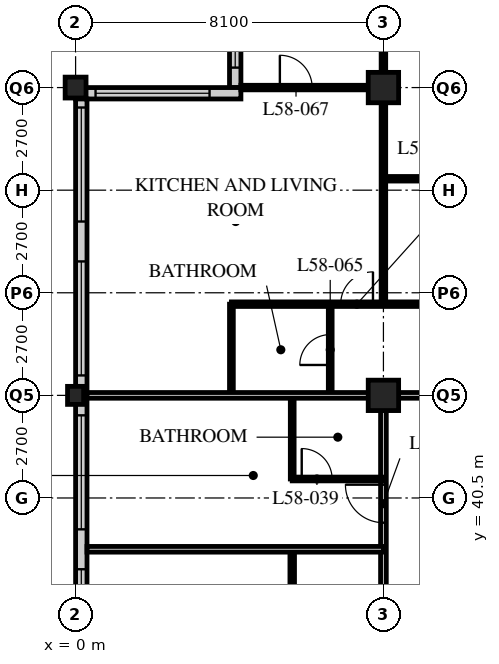
"""IFC4 building model, lengths in metres.
Left out: names, types, materials, properties, quantities, classifications, styles, units other than length and angle.
Written with IfcOpenShell. Run it as: python <this file> out.ifc"""

import sys

from ifc_helpers import new_model, si_unit, direction, frame, frame_2d, origin, origin_2d, place, context, subcontext, project, spatial, rectangle, hollow_rectangle, i_section, extrude, element, fill, save


model = new_model("IFC4")
c1 = context("Model", 3, precision=1e-05, world=origin(), true_north=direction((0.0, 1.0)))
c2 = subcontext(c1, "Body", "Model", "MODEL_VIEW")
j1 = project(units=[si_unit("LENGTHUNIT", "METRE"), si_unit("PLANEANGLEUNIT", "RADIAN")], contexts=[c1])
p1 = place(None, origin())
s1 = spatial("IfcSite", under=j1, at=p1, CompositionType="ELEMENT")
p2 = place(p1, origin())
s2 = spatial("IfcBuilding", under=s1, at=p2, CompositionType="ELEMENT")
p3 = place(p2, frame((0.0, 0.0, 224.4)))
s3 = spatial("IfcBuildingStorey", under=s2, at=p3, CompositionType="ELEMENT", Elevation=224.4)
p4 = place(p3, frame((0.0, 43.2, 0.0), z_axis=(0.0, 0.0, 1.0), x_axis=(1.0, 0.0, 0.0)))
e1 = element("IfcColumn", 1, at=p4, inside=s3, PredefinedType="COLUMN", context=c2, shape_type="SweptSolid", body=[
    extrude(i_section(OverallWidth=0.424, OverallDepth=0.475, WebThickness=0.048, FlangeThickness=0.077, FilletRadius=0.015, at=origin_2d()), origin(), (0.0, 0.0, 1.0), 3.6),
])
p5 = place(p3, frame((0.0, 51.3, 0.0), z_axis=(0.0, 0.0, 1.0), x_axis=(1.0, 0.0, 0.0)))
e2 = element("IfcColumn", 2, at=p5, inside=s3, PredefinedType="COLUMN", context=c2, shape_type="SweptSolid", body=[
    extrude(hollow_rectangle(XDim=0.55, YDim=0.55, WallThickness=0.045, at=origin_2d()), origin(), (0.0, 0.0, 1.0), 3.6),
])
for number, where, z_axis, x_axis in (
    (3, (8.1, 43.2, 0.0), (0.0, 0.0, 1.0), (1.0, 0.0, 0.0)),
    (4, (8.1, 51.3, 0.0), (0.0, 0.0, 1.0), (1.0, 0.0, 0.0)),
):
    element("IfcColumn", number, at=place(p3, frame(where, z_axis=z_axis, x_axis=x_axis)), inside=s3, PredefinedType="COLUMN", context=c2, shape_type="SweptSolid", body=[
        extrude(hollow_rectangle(XDim=0.8, YDim=0.8, WallThickness=0.08, at=origin_2d()), origin(), (0.0, 0.0, 1.0), 3.6),
    ])
p6 = place(p3, frame((4.2, 55.05, 0.0), z_axis=(0.0, 0.0, 1.0), x_axis=(0.0, -1.0, 0.0)))
e5 = element("IfcWall", 5, at=p6, inside=s3, PredefinedType="SOLIDWALL", context=c2, shape_type="SweptSolid", body=[
    extrude(rectangle(XDim=3.75, YDim=0.3, at=frame_2d((1.875, 0.0))), origin(), (0.0, 0.0, 1.0), 3.39),
])
p7 = place(p6, frame((0.225, 0.0, 0.6)))
e6 = element("IfcOpeningElement", 6, at=p7, cuts=e5, PredefinedType="OPENING", context=c2, shape_type="SweptSolid", body=[
    extrude(rectangle(XDim=3.0, YDim=2.0, at=frame_2d((1.5, 1.0))), frame((0.0, 0.16, 0.0), z_axis=(0.0, -1.0, 0.0), x_axis=(1.0, 0.0, 0.0)), (0.0, 0.0, 1.0), 0.32),
])
p8 = place(p3, frame((4.35, 51.15, 0.0), z_axis=(0.0, 0.0, 1.0), x_axis=(-1.0, 0.0, 0.0)))
e7 = element("IfcWall", 7, at=p8, inside=s3, PredefinedType="SOLIDWALL", context=c2, shape_type="SweptSolid", body=[
    extrude(rectangle(XDim=4.35, YDim=0.3, at=frame_2d((2.175, 0.0))), origin(), (0.0, 0.0, 1.0), 3.39),
])
p9 = place(p8, frame((0.825, 0.0, 0.6)))
e8 = element("IfcOpeningElement", 8, at=p9, cuts=e7, PredefinedType="OPENING", context=c2, shape_type="SweptSolid", body=[
    extrude(rectangle(XDim=3.0, YDim=2.0, at=frame_2d((1.5, 1.0))), frame((0.0, 0.16, 0.0), z_axis=(0.0, -1.0, 0.0), x_axis=(1.0, 0.0, 0.0)), (0.0, 0.0, 1.0), 0.32),
])
p10 = place(p3, frame((0.15, 51.0, 0.0), z_axis=(0.0, 0.0, 1.0), x_axis=(0.0, -1.0, 0.0)))
e9 = element("IfcWall", 9, at=p10, inside=s3, PredefinedType="SOLIDWALL", context=c2, shape_type="SweptSolid", body=[
    extrude(rectangle(XDim=32.1, YDim=0.3, at=frame_2d((16.05, 0.0))), origin(), (0.0, 0.0, 1.0), 3.39),
])
p11 = place(p10, frame((0.225, 0.0, 0.6)))
e10 = element("IfcOpeningElement", 10, at=p11, cuts=e9, PredefinedType="OPENING", context=c2, shape_type="SweptSolid", body=[
    extrude(rectangle(XDim=3.0, YDim=2.0, at=frame_2d((1.5, 1.0))), frame((0.0, 0.16, 0.0), z_axis=(0.0, -1.0, 0.0), x_axis=(1.0, 0.0, 0.0)), (0.0, 0.0, 1.0), 0.32),
])
p12 = place(p10, frame((4.275, 0.0, 0.6)))
e11 = element("IfcOpeningElement", 11, at=p12, cuts=e9, PredefinedType="OPENING", context=c2, shape_type="SweptSolid", body=[
    extrude(rectangle(XDim=3.0, YDim=2.0, at=frame_2d((1.5, 1.0))), frame((0.0, 0.16, 0.0), z_axis=(0.0, -1.0, 0.0), x_axis=(1.0, 0.0, 0.0)), (0.0, 0.0, 1.0), 0.32),
])
p13 = place(p10, frame((8.325, 0.0, 0.6)))
e12 = element("IfcOpeningElement", 12, at=p13, cuts=e9, PredefinedType="OPENING", context=c2, shape_type="SweptSolid", body=[
    extrude(rectangle(XDim=3.0, YDim=2.0, at=frame_2d((1.5, 1.0))), frame((0.0, 0.16, 0.0), z_axis=(0.0, -1.0, 0.0), x_axis=(1.0, 0.0, 0.0)), (0.0, 0.0, 1.0), 0.32),
])
p14 = place(p10, frame((12.375, 0.0, 0.6)))
e13 = element("IfcOpeningElement", 13, at=p14, cuts=e9, PredefinedType="OPENING", context=c2, shape_type="SweptSolid", body=[
    extrude(rectangle(XDim=3.0, YDim=2.0, at=frame_2d((1.5, 1.0))), frame((0.0, 0.16, 0.0), z_axis=(0.0, -1.0, 0.0), x_axis=(1.0, 0.0, 0.0)), (0.0, 0.0, 1.0), 0.32),
])
p15 = place(p10, frame((16.425, 0.0, 0.6)))
e14 = element("IfcOpeningElement", 14, at=p15, cuts=e9, PredefinedType="OPENING", context=c2, shape_type="SweptSolid", body=[
    extrude(rectangle(XDim=3.0, YDim=2.0, at=frame_2d((1.5, 1.0))), frame((0.0, 0.16, 0.0), z_axis=(0.0, -1.0, 0.0), x_axis=(1.0, 0.0, 0.0)), (0.0, 0.0, 1.0), 0.32),
])
p16 = place(p10, frame((20.475, 0.0, 0.6)))
e15 = element("IfcOpeningElement", 15, at=p16, cuts=e9, PredefinedType="OPENING", context=c2, shape_type="SweptSolid", body=[
    extrude(rectangle(XDim=3.0, YDim=2.0, at=frame_2d((1.5, 1.0))), frame((0.0, 0.16, 0.0), z_axis=(0.0, -1.0, 0.0), x_axis=(1.0, 0.0, 0.0)), (0.0, 0.0, 1.0), 0.32),
])
p17 = place(p10, frame((24.525, 0.0, 0.6)))
e16 = element("IfcOpeningElement", 16, at=p17, cuts=e9, PredefinedType="OPENING", context=c2, shape_type="SweptSolid", body=[
    extrude(rectangle(XDim=3.0, YDim=2.0, at=frame_2d((1.5, 1.0))), frame((0.0, 0.16, 0.0), z_axis=(0.0, -1.0, 0.0), x_axis=(1.0, 0.0, 0.0)), (0.0, 0.0, 1.0), 0.32),
])
p18 = place(p10, frame((28.575, 0.0, 0.6)))
e17 = element("IfcOpeningElement", 17, at=p18, cuts=e9, PredefinedType="OPENING", context=c2, shape_type="SweptSolid", body=[
    extrude(rectangle(XDim=3.0, YDim=2.0, at=frame_2d((1.5, 1.0))), frame((0.0, 0.16, 0.0), z_axis=(0.0, -1.0, 0.0), x_axis=(1.0, 0.0, 0.0)), (0.0, 0.0, 1.0), 0.32),
])
p19 = place(p3, frame((8.1, 43.2, 0.0), z_axis=(0.0, 0.0, 1.0), x_axis=(1.0, 0.0, 0.0)))
e18 = element("IfcWall", 18, at=p19, inside=s3, PredefinedType="PARTITIONING", context=c2, shape_type="SweptSolid", body=[
    extrude(rectangle(XDim=36.45, YDim=0.15, at=frame_2d((18.225, 0.0))), origin(), (0.0, 0.0, 1.0), 2.628),
])
p20 = place(p19, frame((4.45, 0.0, 0.0)))
e19 = element("IfcOpeningElement", 19, at=p20, cuts=e18, PredefinedType="OPENING", context=c2, shape_type="SweptSolid", body=[
    extrude(rectangle(XDim=1.0, YDim=2.1, at=frame_2d((0.5, 1.05))), frame((0.0, 0.085, 0.0), z_axis=(0.0, -1.0, 0.0), x_axis=(1.0, 0.0, 0.0)), (0.0, 0.0, 1.0), 0.17),
])
p21 = place(p19, frame((17.1, 0.0, 0.0)))
e20 = element("IfcOpeningElement", 20, at=p21, cuts=e18, PredefinedType="OPENING", context=c2, shape_type="SweptSolid", body=[
    extrude(rectangle(XDim=1.0, YDim=2.1, at=frame_2d((0.5, 1.05))), frame((0.0, 0.085, 0.0), z_axis=(0.0, -1.0, 0.0), x_axis=(1.0, 0.0, 0.0)), (0.0, 0.0, 1.0), 0.17),
])
p22 = place(p19, frame((29.05, 0.0, 0.0)))
e21 = element("IfcOpeningElement", 21, at=p22, cuts=e18, PredefinedType="OPENING", context=c2, shape_type="SweptSolid", body=[
    extrude(rectangle(XDim=1.0, YDim=2.1, at=frame_2d((0.5, 1.05))), frame((0.0, 0.085, 0.0), z_axis=(0.0, -1.0, 0.0), x_axis=(1.0, 0.0, 0.0)), (0.0, 0.0, 1.0), 0.17),
])
p23 = place(p19, frame((33.925, 0.0, 0.0)))
e22 = element("IfcOpeningElement", 22, at=p23, cuts=e18, PredefinedType="OPENING", context=c2, shape_type="SweptSolid", body=[
    extrude(rectangle(XDim=1.0, YDim=2.1, at=frame_2d((0.5, 1.05))), frame((0.0, 0.085, 0.0), z_axis=(0.0, -1.0, 0.0), x_axis=(1.0, 0.0, 0.0)), (0.0, 0.0, 1.0), 0.17),
])
p24 = place(p19, frame((1.525, 0.0, 0.0)))
e23 = element("IfcOpeningElement", 23, at=p24, cuts=e18, PredefinedType="OPENING", context=c2, shape_type="SweptSolid", body=[
    extrude(rectangle(XDim=1.0, YDim=2.1, at=frame_2d((0.5, 1.05))), frame((0.0, 0.085, 0.0), z_axis=(0.0, -1.0, 0.0), x_axis=(1.0, 0.0, 0.0)), (0.0, 0.0, 1.0), 0.17),
])
p25 = place(p3, frame((8.1, 18.9, 0.0), z_axis=(0.0, 0.0, 1.0), x_axis=(0.0, 1.0, 0.0)))
e24 = element("IfcWall", 24, at=p25, inside=s3, PredefinedType="PARTITIONING", context=c2, shape_type="SweptSolid", body=[
    extrude(rectangle(XDim=24.3, YDim=0.15, at=frame_2d((12.15, 0.0))), origin(), (0.0, 0.0, 1.0), 2.628),
])
p26 = place(p25, frame((0.9, 0.0, 0.0)))
e25 = element("IfcOpeningElement", 25, at=p26, cuts=e24, PredefinedType="OPENING", context=c2, shape_type="SweptSolid", body=[
    extrude(rectangle(XDim=1.0, YDim=2.1, at=frame_2d((0.5, 1.05))), frame((0.0, 0.085, 0.0), z_axis=(0.0, -1.0, 0.0), x_axis=(1.0, 0.0, 0.0)), (0.0, 0.0, 1.0), 0.17),
])
p27 = place(p25, frame((20.95, 0.0, 0.0)))
e26 = element("IfcOpeningElement", 26, at=p27, cuts=e24, PredefinedType="OPENING", context=c2, shape_type="SweptSolid", body=[
    extrude(rectangle(XDim=1.0, YDim=2.1, at=frame_2d((0.5, 1.05))), frame((0.0, 0.085, 0.0), z_axis=(0.0, -1.0, 0.0), x_axis=(1.0, 0.0, 0.0)), (0.0, 0.0, 1.0), 0.17),
])
p28 = place(p3, frame((5.7, 18.9, 0.0), z_axis=(0.0, 0.0, 1.0), x_axis=(0.0, 1.0, 0.0)))
e27 = element("IfcWall", 27, at=p28, inside=s3, PredefinedType="PARTITIONING", context=c2, shape_type="SweptSolid", body=[
    extrude(rectangle(XDim=20.25, YDim=0.12, at=frame_2d((10.125, 0.0))), origin(), (0.0, 0.0, 1.0), 3.39),
])
p29 = place(p28, frame((0.975, 0.0, 0.0)))
e28 = element("IfcOpeningElement", 28, at=p29, cuts=e27, PredefinedType="OPENING", context=c2, shape_type="SweptSolid", body=[
    extrude(rectangle(XDim=0.85, YDim=2.1, at=frame_2d((0.425, 1.05))), frame((0.0, 0.07, 0.0), z_axis=(0.0, -1.0, 0.0), x_axis=(1.0, 0.0, 0.0)), (0.0, 0.0, 1.0), 0.14),
])
p30 = place(p28, frame((8.425, 0.0, 0.0)))
e29 = element("IfcOpeningElement", 29, at=p30, cuts=e27, PredefinedType="OPENING", context=c2, shape_type="SweptSolid", body=[
    extrude(rectangle(XDim=0.85, YDim=2.1, at=frame_2d((0.425, 1.05))), frame((0.0, 0.07, 0.0), z_axis=(0.0, -1.0, 0.0), x_axis=(1.0, 0.0, 0.0)), (0.0, 0.0, 1.0), 0.14),
])
p31 = place(p28, frame((12.475, 0.0, 0.0)))
e30 = element("IfcOpeningElement", 30, at=p31, cuts=e27, PredefinedType="OPENING", context=c2, shape_type="SweptSolid", body=[
    extrude(rectangle(XDim=0.85, YDim=2.1, at=frame_2d((0.425, 1.05))), frame((0.0, 0.07, 0.0), z_axis=(0.0, -1.0, 0.0), x_axis=(1.0, 0.0, 0.0)), (0.0, 0.0, 1.0), 0.14),
])
p32 = place(p28, frame((16.525, 0.0, 0.0)))
e31 = element("IfcOpeningElement", 31, at=p32, cuts=e27, PredefinedType="OPENING", context=c2, shape_type="SweptSolid", body=[
    extrude(rectangle(XDim=0.85, YDim=2.1, at=frame_2d((0.425, 1.05))), frame((0.0, 0.07, 0.0), z_axis=(0.0, -1.0, 0.0), x_axis=(1.0, 0.0, 0.0)), (0.0, 0.0, 1.0), 0.14),
])
p33 = place(p3, frame((8.1, 39.15, 0.0), z_axis=(0.0, 0.0, 1.0), x_axis=(-1.0, 0.0, 0.0)))
e32 = element("IfcWall", 32, at=p33, inside=s3, PredefinedType="PARTITIONING", context=c2, shape_type="SweptSolid", body=[
    extrude(rectangle(XDim=7.8, YDim=0.15, at=frame_2d((3.9, 0.0))), origin(), (0.0, 0.0, 1.0), 3.39),
])
p34 = place(p3, frame((5.7, 41.0, 0.0), z_axis=(0.0, 0.0, 1.0), x_axis=(0.0, 1.0, 0.0)))
e33 = element("IfcWall", 33, at=p34, inside=s3, PredefinedType="PARTITIONING", context=c2, shape_type="SweptSolid", body=[
    extrude(rectangle(XDim=2.2, YDim=0.1, at=frame_2d((1.1, 0.0))), origin(), (0.0, 0.0, 1.0), 3.39),
])
p35 = place(p3, frame((8.1, 41.0, 0.0), z_axis=(0.0, 0.0, 1.0), x_axis=(-1.0, 0.0, 0.0)))
e34 = element("IfcWall", 34, at=p35, inside=s3, PredefinedType="PARTITIONING", context=c2, shape_type="SweptSolid", body=[
    extrude(rectangle(XDim=2.4, YDim=0.1, at=frame_2d((1.2, 0.0))), origin(), (0.0, 0.0, 1.0), 3.39),
])
p36 = place(p35, frame((1.35, 0.0, 0.0)))
e35 = element("IfcOpeningElement", 35, at=p36, cuts=e34, PredefinedType="OPENING", context=c2, shape_type="SweptSolid", body=[
    extrude(rectangle(XDim=0.8, YDim=2.1, at=frame_2d((0.4, 1.05))), frame((0.0, 0.06, 0.0), z_axis=(0.0, -1.0, 0.0), x_axis=(1.0, 0.0, 0.0)), (0.0, 0.0, 1.0), 0.12),
])
p37 = place(p3, frame((6.7, 43.2, 0.0), z_axis=(0.0, 0.0, 1.0), x_axis=(0.0, 1.0, 0.0)))
e36 = element("IfcWall", 36, at=p37, inside=s3, PredefinedType="PARTITIONING", context=c2, shape_type="SweptSolid", body=[
    extrude(rectangle(XDim=2.4, YDim=0.1, at=frame_2d((1.2, 0.0))), origin(), (0.0, 0.0, 1.0), 3.39),
])
p38 = place(p37, frame((0.8, 0.0, 0.0)))
e37 = element("IfcOpeningElement", 37, at=p38, cuts=e36, PredefinedType="OPENING", context=c2, shape_type="SweptSolid", body=[
    extrude(rectangle(XDim=0.8, YDim=2.1, at=frame_2d((0.4, 1.05))), frame((0.0, 0.06, 0.0), z_axis=(0.0, -1.0, 0.0), x_axis=(1.0, 0.0, 0.0)), (0.0, 0.0, 1.0), 0.12),
])
p39 = place(p3, frame((4.1, 43.2, 0.0), z_axis=(0.0, 0.0, 1.0), x_axis=(0.0, 1.0, 0.0)))
e38 = element("IfcWall", 38, at=p39, inside=s3, PredefinedType="PARTITIONING", context=c2, shape_type="SweptSolid", body=[
    extrude(rectangle(XDim=2.4, YDim=0.1, at=frame_2d((1.2, 0.0))), origin(), (0.0, 0.0, 1.0), 3.39),
])
p40 = place(p3, frame((4.1, 45.6, 0.0), z_axis=(0.0, 0.0, 1.0), x_axis=(1.0, 0.0, 0.0)))
e39 = element("IfcWall", 39, at=p40, inside=s3, PredefinedType="PARTITIONING", context=c2, shape_type="SweptSolid", body=[
    extrude(rectangle(XDim=32.35, YDim=0.12, at=frame_2d((16.175, 0.0))), origin(), (0.0, 0.0, 1.0), 3.39),
])
p41 = place(p40, frame((9.025, 0.0, 0.0)))
e40 = element("IfcOpeningElement", 40, at=p41, cuts=e39, PredefinedType="OPENING", context=c2, shape_type="SweptSolid", body=[
    extrude(rectangle(XDim=0.85, YDim=2.1, at=frame_2d((0.425, 1.05))), frame((0.0, 0.07, 0.0), z_axis=(0.0, -1.0, 0.0), x_axis=(1.0, 0.0, 0.0)), (0.0, 0.0, 1.0), 0.14),
])
p42 = place(p40, frame((16.475, 0.0, 0.0)))
e41 = element("IfcOpeningElement", 41, at=p42, cuts=e39, PredefinedType="OPENING", context=c2, shape_type="SweptSolid", body=[
    extrude(rectangle(XDim=0.85, YDim=2.1, at=frame_2d((0.425, 1.05))), frame((0.0, 0.07, 0.0), z_axis=(0.0, -1.0, 0.0), x_axis=(1.0, 0.0, 0.0)), (0.0, 0.0, 1.0), 0.14),
])
p43 = place(p40, frame((21.175, 0.0, 0.0)))
e42 = element("IfcOpeningElement", 42, at=p43, cuts=e39, PredefinedType="OPENING", context=c2, shape_type="SweptSolid", body=[
    extrude(rectangle(XDim=0.85, YDim=2.1, at=frame_2d((0.425, 1.05))), frame((0.0, 0.07, 0.0), z_axis=(0.0, -1.0, 0.0), x_axis=(1.0, 0.0, 0.0)), (0.0, 0.0, 1.0), 0.14),
])
p44 = place(p40, frame((28.625, 0.0, 0.0)))
e43 = element("IfcOpeningElement", 43, at=p44, cuts=e39, PredefinedType="OPENING", context=c2, shape_type="SweptSolid", body=[
    extrude(rectangle(XDim=0.85, YDim=2.1, at=frame_2d((0.425, 1.05))), frame((0.0, 0.07, 0.0), z_axis=(0.0, -1.0, 0.0), x_axis=(1.0, 0.0, 0.0)), (0.0, 0.0, 1.0), 0.14),
])
p45 = place(p40, frame((6.725, 0.0, 0.0)))
e44 = element("IfcOpeningElement", 44, at=p45, cuts=e39, PredefinedType="OPENING", context=c2, shape_type="SweptSolid", body=[
    extrude(rectangle(XDim=0.85, YDim=2.1, at=frame_2d((0.425, 1.05))), frame((0.0, 0.07, 0.0), z_axis=(0.0, -1.0, 0.0), x_axis=(1.0, 0.0, 0.0)), (0.0, 0.0, 1.0), 0.14),
])
p46 = place(p40, frame((2.875, 0.0, 0.0)))
e45 = element("IfcOpeningElement", 45, at=p46, cuts=e39, PredefinedType="OPENING", context=c2, shape_type="SweptSolid", body=[
    extrude(rectangle(XDim=0.85, YDim=2.1, at=frame_2d((0.425, 1.05))), frame((0.0, 0.07, 0.0), z_axis=(0.0, -1.0, 0.0), x_axis=(1.0, 0.0, 0.0)), (0.0, 0.0, 1.0), 0.14),
])
p47 = place(p3, frame((8.1, 45.6, 0.0), z_axis=(0.0, 0.0, 1.0), x_axis=(0.0, 1.0, 0.0)))
e46 = element("IfcWall", 46, at=p47, inside=s3, PredefinedType="PARTITIONING", context=c2, shape_type="SweptSolid", body=[
    extrude(rectangle(XDim=9.45, YDim=0.12, at=frame_2d((4.725, 0.0))), origin(), (0.0, 0.0, 1.0), 2.628),
])
p48 = place(p3, frame((8.1, 51.3, 0.0), z_axis=(0.0, 0.0, 1.0), x_axis=(-1.0, 0.0, 0.0)))
e47 = element("IfcWall", 47, at=p48, inside=s3, PredefinedType="PARTITIONING", context=c2, shape_type="SweptSolid", body=[
    extrude(rectangle(XDim=3.75, YDim=0.12, at=frame_2d((1.875, 0.0))), origin(), (0.0, 0.0, 1.0), 2.628),
])
p49 = place(p48, frame((1.875, 0.0, 0.0)))
e48 = element("IfcOpeningElement", 48, at=p49, cuts=e47, PredefinedType="OPENING", context=c2, shape_type="SweptSolid", body=[
    extrude(rectangle(XDim=0.85, YDim=2.1, at=frame_2d((0.425, 1.05))), frame((0.0, 0.07, 0.0), z_axis=(0.0, -1.0, 0.0), x_axis=(1.0, 0.0, 0.0)), (0.0, 0.0, 1.0), 0.14),
])
p50 = place(p3, frame((0.3, 43.2, 0.0), z_axis=(0.0, 0.0, 1.0), x_axis=(1.0, 0.0, 0.0)))
e49 = element("IfcWall", 49, at=p50, inside=s3, PredefinedType="PARTITIONING", context=c2, shape_type="SweptSolid", body=[
    extrude(rectangle(XDim=7.8, YDim=0.15, at=frame_2d((3.9, 0.0))), origin(), (0.0, 0.0, 1.0), 2.628),
])
p51 = place(p3, frame((8.1, 48.9, 0.0), z_axis=(0.0, 0.0, 1.0), x_axis=(1.0, 0.0, 0.0)))
e50 = element("IfcWall", 50, at=p51, inside=s3, PredefinedType="PARTITIONING", context=c2, shape_type="SweptSolid", body=[
    extrude(rectangle(XDim=4.05, YDim=0.12, at=frame_2d((2.025, 0.0))), origin(), (0.0, 0.0, 1.0), 3.39),
])
p52 = place(p51, frame((1.6, 0.0, 0.0)))
e51 = element("IfcOpeningElement", 51, at=p52, cuts=e50, PredefinedType="OPENING", context=c2, shape_type="SweptSolid", body=[
    extrude(rectangle(XDim=0.85, YDim=2.1, at=frame_2d((0.425, 1.05))), frame((0.0, 0.07, 0.0), z_axis=(0.0, -1.0, 0.0), x_axis=(1.0, 0.0, 0.0)), (0.0, 0.0, 1.0), 0.14),
])
p53 = place(p7, origin())
e52 = element("IfcWindow", 52, at=p53, inside=s3, PartitioningType="SINGLE_PANEL", PredefinedType="WINDOW", context=c2, shape_type="SweptSolid", body=[
    extrude(rectangle(XDim=3.0, YDim=2.0, at=frame_2d((1.5, 1.0))), frame((0.0, 0.03, 0.0), z_axis=(0.0, -1.0, 0.0), x_axis=(1.0, 0.0, 0.0)), (0.0, 0.0, 1.0), 0.06),
])
fill(e6, e52)
p54 = place(p9, origin())
e53 = element("IfcWindow", 53, at=p54, inside=s3, PartitioningType="SINGLE_PANEL", PredefinedType="WINDOW", context=c2, shape_type="SweptSolid", body=[
    extrude(rectangle(XDim=3.0, YDim=2.0, at=frame_2d((1.5, 1.0))), frame((0.0, 0.03, 0.0), z_axis=(0.0, -1.0, 0.0), x_axis=(1.0, 0.0, 0.0)), (0.0, 0.0, 1.0), 0.06),
])
fill(e8, e53)
p55 = place(p11, origin())
e54 = element("IfcWindow", 54, at=p55, inside=s3, PartitioningType="SINGLE_PANEL", PredefinedType="WINDOW", context=c2, shape_type="SweptSolid", body=[
    extrude(rectangle(XDim=3.0, YDim=2.0, at=frame_2d((1.5, 1.0))), frame((0.0, 0.03, 0.0), z_axis=(0.0, -1.0, 0.0), x_axis=(1.0, 0.0, 0.0)), (0.0, 0.0, 1.0), 0.06),
])
fill(e10, e54)
p56 = place(p12, origin())
e55 = element("IfcWindow", 55, at=p56, inside=s3, PartitioningType="SINGLE_PANEL", PredefinedType="WINDOW", context=c2, shape_type="SweptSolid", body=[
    extrude(rectangle(XDim=3.0, YDim=2.0, at=frame_2d((1.5, 1.0))), frame((0.0, 0.03, 0.0), z_axis=(0.0, -1.0, 0.0), x_axis=(1.0, 0.0, 0.0)), (0.0, 0.0, 1.0), 0.06),
])
fill(e11, e55)
p57 = place(p13, origin())
e56 = element("IfcWindow", 56, at=p57, inside=s3, PartitioningType="SINGLE_PANEL", PredefinedType="WINDOW", context=c2, shape_type="SweptSolid", body=[
    extrude(rectangle(XDim=3.0, YDim=2.0, at=frame_2d((1.5, 1.0))), frame((0.0, 0.03, 0.0), z_axis=(0.0, -1.0, 0.0), x_axis=(1.0, 0.0, 0.0)), (0.0, 0.0, 1.0), 0.06),
])
fill(e12, e56)
p58 = place(p14, origin())
e57 = element("IfcWindow", 57, at=p58, inside=s3, PartitioningType="SINGLE_PANEL", PredefinedType="WINDOW", context=c2, shape_type="SweptSolid", body=[
    extrude(rectangle(XDim=3.0, YDim=2.0, at=frame_2d((1.5, 1.0))), frame((0.0, 0.03, 0.0), z_axis=(0.0, -1.0, 0.0), x_axis=(1.0, 0.0, 0.0)), (0.0, 0.0, 1.0), 0.06),
])
fill(e13, e57)
p59 = place(p36, origin())
e58 = element("IfcDoor", 58, at=p59, inside=s3, OperationType="SINGLE_SWING_LEFT", PredefinedType="DOOR", context=c2, shape_type="SweptSolid", body=[
    extrude(rectangle(XDim=0.8, YDim=2.1, at=frame_2d((0.4, 1.05))), frame((0.0, 0.025, 0.0), z_axis=(0.0, -1.0, 0.0), x_axis=(1.0, 0.0, 0.0)), (0.0, 0.0, 1.0), 0.05),
])
fill(e35, e58)
p60 = place(p27, origin())
e59 = element("IfcDoor", 59, at=p60, inside=s3, OperationType="SINGLE_SWING_RIGHT", PredefinedType="DOOR", context=c2, shape_type="SweptSolid", body=[
    extrude(rectangle(XDim=1.0, YDim=2.1, at=frame_2d((0.5, 1.05))), frame((0.0, 0.025, 0.0), z_axis=(0.0, -1.0, 0.0), x_axis=(1.0, 0.0, 0.0)), (0.0, 0.0, 1.0), 0.05),
])
fill(e26, e59)
p61 = place(p38, origin())
e60 = element("IfcDoor", 60, at=p61, inside=s3, OperationType="SINGLE_SWING_LEFT", PredefinedType="DOOR", context=c2, shape_type="SweptSolid", body=[
    extrude(rectangle(XDim=0.8, YDim=2.1, at=frame_2d((0.4, 1.05))), frame((0.0, 0.025, 0.0), z_axis=(0.0, -1.0, 0.0), x_axis=(1.0, 0.0, 0.0)), (0.0, 0.0, 1.0), 0.05),
])
fill(e37, e60)
p62 = place(p46, origin())
e61 = element("IfcDoor", 61, at=p62, inside=s3, OperationType="SINGLE_SWING_RIGHT", PredefinedType="DOOR", context=c2, shape_type="SweptSolid", body=[
    extrude(rectangle(XDim=0.85, YDim=2.1, at=frame_2d((0.425, 1.05))), frame((0.0, 0.025, 0.0), z_axis=(0.0, -1.0, 0.0), x_axis=(1.0, 0.0, 0.0)), (0.0, 0.0, 1.0), 0.05),
])
fill(e45, e61)
p63 = place(p49, origin())
e62 = element("IfcDoor", 62, at=p63, inside=s3, OperationType="SINGLE_SWING_LEFT", PredefinedType="DOOR", context=c2, shape_type="SweptSolid", body=[
    extrude(rectangle(XDim=0.85, YDim=2.1, at=frame_2d((0.425, 1.05))), frame((0.0, 0.025, 0.0), z_axis=(0.0, -1.0, 0.0), x_axis=(1.0, 0.0, 0.0)), (0.0, 0.0, 1.0), 0.05),
])
fill(e48, e62)
save(model, sys.argv[1])
